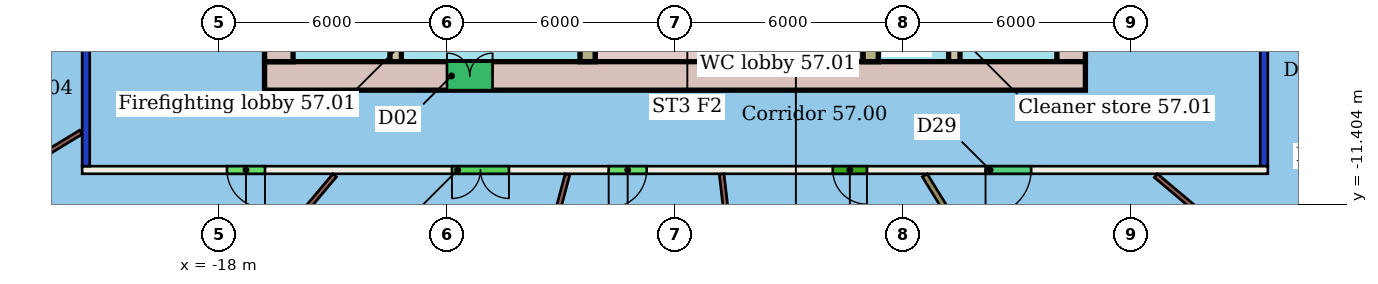
"""IFC4 building model, lengths in metres.
Left out: names, types, materials, properties, quantities, classifications, styles, units other than length and angle.
Written with IfcOpenShell. Run it as: python <this file> out.ifc"""

import sys

from ifc_helpers import new_model, si_unit, direction, frame, frame_2d, origin, place, context, subcontext, project, spatial, rectangle, extrude, element, fill, save


model = new_model("IFC4")
c1 = context("Model", 3, precision=1e-05, world=origin(), true_north=direction((0.0, 1.0)))
c2 = subcontext(c1, "Body", "Model", "MODEL_VIEW")
j1 = project(units=[si_unit("LENGTHUNIT", "METRE"), si_unit("PLANEANGLEUNIT", "RADIAN")], contexts=[c1])
p1 = place(None, origin())
s1 = spatial("IfcSite", under=j1, at=p1, CompositionType="ELEMENT")
p2 = place(p1, origin())
s2 = spatial("IfcBuilding", under=s1, at=p2, CompositionType="ELEMENT")
p3 = place(p2, frame((0.0, 0.0, 231.7)))
s3 = spatial("IfcBuildingStorey", under=s2, at=p3, CompositionType="ELEMENT", Elevation=231.7)
p4 = place(p3, frame((9.6, -10.5, 0.0), z_axis=(0.0, 0.0, 1.0), x_axis=(-1.0, 0.0, 0.0)))
e1 = element("IfcWall", 1, at=p4, inside=s3, PredefinedType="PARTITIONING", context=c2, shape_type="SweptSolid", body=[
    extrude(rectangle(XDim=31.2, YDim=0.2, at=frame_2d((15.6, 0.0))), origin(), (0.0, 0.0, 1.0), 3.45),
])
p5 = place(p4, frame((26.389, 0.0, 0.0)))
e2 = element("IfcOpeningElement", 2, at=p5, cuts=e1, PredefinedType="OPENING", context=c2, shape_type="SweptSolid", body=[
    extrude(rectangle(XDim=1.0, YDim=2.4, at=frame_2d((0.5, 1.2))), frame((0.0, 0.11, 0.0), z_axis=(0.0, -1.0, 0.0), x_axis=(1.0, 0.0, 0.0)), (0.0, 0.0, 1.0), 0.22),
])
p6 = place(p4, frame((19.969, 0.0, 0.0)))
e3 = element("IfcOpeningElement", 3, at=p6, cuts=e1, PredefinedType="OPENING", context=c2, shape_type="SweptSolid", body=[
    extrude(rectangle(XDim=1.5, YDim=2.1, at=frame_2d((0.75, 1.05))), frame((0.0, 0.11, 0.0), z_axis=(0.0, -1.0, 0.0), x_axis=(1.0, 0.0, 0.0)), (0.0, 0.0, 1.0), 0.22),
])
p7 = place(p4, frame((16.344, 0.0, 0.0)))
e4 = element("IfcOpeningElement", 4, at=p7, cuts=e1, PredefinedType="OPENING", context=c2, shape_type="SweptSolid", body=[
    extrude(rectangle(XDim=1.0, YDim=2.4, at=frame_2d((0.5, 1.2))), frame((0.0, 0.11, 0.0), z_axis=(0.0, -1.0, 0.0), x_axis=(1.0, 0.0, 0.0)), (0.0, 0.0, 1.0), 0.22),
])
p8 = place(p4, frame((10.549, 0.0, 0.0)))
e5 = element("IfcOpeningElement", 5, at=p8, cuts=e1, PredefinedType="OPENING", context=c2, shape_type="SweptSolid", body=[
    extrude(rectangle(XDim=0.9, YDim=2.1, at=frame_2d((0.45, 1.05))), frame((0.0, 0.11, 0.0), z_axis=(0.0, -1.0, 0.0), x_axis=(1.0, 0.0, 0.0)), (0.0, 0.0, 1.0), 0.22),
])
p9 = place(p4, frame((6.228, 0.0, 0.0)))
e6 = element("IfcOpeningElement", 6, at=p9, cuts=e1, PredefinedType="OPENING", context=c2, shape_type="SweptSolid", body=[
    extrude(rectangle(XDim=1.2, YDim=2.4, at=frame_2d((0.6, 1.2))), frame((0.0, 0.11, 0.0), z_axis=(0.0, -1.0, 0.0), x_axis=(1.0, 0.0, 0.0)), (0.0, 0.0, 1.0), 0.22),
])
p10 = place(p3, frame((-21.5, -10.4, 0.0), z_axis=(0.0, 0.0, 1.0), x_axis=(0.0, 1.0, 0.0)))
e7 = element("IfcWall", 7, at=p10, inside=s3, PredefinedType="PARTITIONING", context=c2, shape_type="SweptSolid", body=[
    extrude(rectangle(XDim=20.8, YDim=0.2, at=frame_2d((10.4, 0.0))), origin(), (0.0, 0.0, 1.0), 3.05),
])
p11 = place(p10, frame((14.304, 0.0, 0.0)))
e8 = element("IfcOpeningElement", 8, at=p11, cuts=e7, PredefinedType="OPENING", context=c2, shape_type="SweptSolid", body=[
    extrude(rectangle(XDim=1.0, YDim=2.4, at=frame_2d((0.5, 1.2))), frame((0.0, 0.11, 0.0), z_axis=(0.0, -1.0, 0.0), x_axis=(1.0, 0.0, 0.0)), (0.0, 0.0, 1.0), 0.22),
])
p12 = place(p10, frame((7.593, 0.0, 0.0)))
e9 = element("IfcOpeningElement", 9, at=p12, cuts=e7, PredefinedType="OPENING", context=c2, shape_type="SweptSolid", body=[
    extrude(rectangle(XDim=1.0, YDim=2.4, at=frame_2d((0.5, 1.2))), frame((0.0, 0.11, 0.0), z_axis=(0.0, -1.0, 0.0), x_axis=(1.0, 0.0, 0.0)), (0.0, 0.0, 1.0), 0.22),
])
p13 = place(p3, frame((9.5, 10.4, 0.0), z_axis=(0.0, 0.0, 1.0), x_axis=(0.0, -1.0, 0.0)))
e10 = element("IfcWall", 10, at=p13, inside=s3, PredefinedType="PARTITIONING", context=c2, shape_type="SweptSolid", body=[
    extrude(rectangle(XDim=20.8, YDim=0.2, at=frame_2d((10.4, 0.0))), origin(), (0.0, 0.0, 1.0), 3.05),
])
p14 = place(p13, frame((15.989, 0.0, 0.0)))
e11 = element("IfcOpeningElement", 11, at=p14, cuts=e10, PredefinedType="OPENING", context=c2, shape_type="SweptSolid", body=[
    extrude(rectangle(XDim=1.0, YDim=2.4, at=frame_2d((0.5, 1.2))), frame((0.0, 0.11, 0.0), z_axis=(0.0, -1.0, 0.0), x_axis=(1.0, 0.0, 0.0)), (0.0, 0.0, 1.0), 0.22),
])
p15 = place(p13, frame((11.814, 0.0, 0.0)))
e12 = element("IfcOpeningElement", 12, at=p15, cuts=e10, PredefinedType="OPENING", context=c2, shape_type="SweptSolid", body=[
    extrude(rectangle(XDim=1.0, YDim=2.4, at=frame_2d((0.5, 1.2))), frame((0.0, 0.11, 0.0), z_axis=(0.0, -1.0, 0.0), x_axis=(1.0, 0.0, 0.0)), (0.0, 0.0, 1.0), 0.22),
])
p16 = place(p13, frame((6.499, 0.0, 0.0)))
e13 = element("IfcOpeningElement", 13, at=p16, cuts=e10, PredefinedType="OPENING", context=c2, shape_type="SweptSolid", body=[
    extrude(rectangle(XDim=0.9, YDim=2.1, at=frame_2d((0.45, 1.05))), frame((0.0, 0.11, 0.0), z_axis=(0.0, -1.0, 0.0), x_axis=(1.0, 0.0, 0.0)), (0.0, 0.0, 1.0), 0.22),
])
p17 = place(p13, frame((2.673, 0.0, 0.0)))
e14 = element("IfcOpeningElement", 14, at=p17, cuts=e10, PredefinedType="OPENING", context=c2, shape_type="SweptSolid", body=[
    extrude(rectangle(XDim=1.2, YDim=2.4, at=frame_2d((0.6, 1.2))), frame((0.0, 0.11, 0.0), z_axis=(0.0, -1.0, 0.0), x_axis=(1.0, 0.0, 0.0)), (0.0, 0.0, 1.0), 0.22),
])
p18 = place(p3, frame((-28.092, -13.434, 0.0), z_axis=(0.0, 0.0, 1.0), x_axis=(0.854426088505, 0.519572958574, 0.0)))
e15 = element("IfcWall", 15, at=p18, inside=s3, PredefinedType="PARTITIONING", context=c2, shape_type="SweptSolid", body=[
    extrude(rectangle(XDim=7.56, YDim=0.125, at=frame_2d((3.78, 0.0))), origin(), (0.0, 0.0, 1.0), 3.45),
])
p19 = place(p3, frame((-23.067, -20.282, 0.0), z_axis=(0.0, 0.0, 1.0), x_axis=(0.643851122285, 0.765150790585, 0.0)))
e16 = element("IfcWall", 16, at=p19, inside=s3, PredefinedType="PARTITIONING", context=c2, shape_type="SweptSolid", body=[
    extrude(rectangle(XDim=12.602, YDim=0.125, at=frame_2d((6.301, 0.0))), origin(), (0.0, 0.0, 1.0), 3.45),
])
p20 = place(p3, frame((-12.538, -24.528, 0.0), z_axis=(0.0, 0.0, 1.0), x_axis=(0.257564493881, 0.966261109376, 0.0)))
e17 = element("IfcWall", 17, at=p20, inside=s3, PredefinedType="PARTITIONING", context=c2, shape_type="SweptSolid", body=[
    extrude(rectangle(XDim=14.397, YDim=0.125, at=frame_2d((7.199, 0.0))), origin(), (0.0, 0.0, 1.0), 3.45),
])
p21 = place(p3, frame((-3.289, -23.414, 0.0), z_axis=(0.0, 0.0, 1.0), x_axis=(-0.115007216791, 0.993364656149, 0.0)))
e18 = element("IfcWall", 18, at=p21, inside=s3, PredefinedType="PARTITIONING", context=c2, shape_type="SweptSolid", body=[
    extrude(rectangle(XDim=12.892, YDim=0.125, at=frame_2d((6.446, 0.0))), origin(), (0.0, 0.0, 1.0), 3.45),
])
p22 = place(p3, frame((5.564, -18.722, 0.0), z_axis=(0.0, 0.0, 1.0), x_axis=(-0.525503275837, 0.850791576759, 0.0)))
e19 = element("IfcWall", 19, at=p22, inside=s3, PredefinedType="PARTITIONING", context=c2, shape_type="SweptSolid", body=[
    extrude(rectangle(XDim=9.5, YDim=0.15, at=frame_2d((4.75, 0.0))), origin(), (0.0, 0.0, 1.0), 3.45),
])
p23 = place(p3, frame((10.561, -13.936, 0.0), z_axis=(0.0, 0.0, 1.0), x_axis=(-0.765140481773, 0.643863373048, 0.0)))
e20 = element("IfcWall", 20, at=p23, inside=s3, PredefinedType="PARTITIONING", context=c2, shape_type="SweptSolid", body=[
    extrude(rectangle(XDim=5.107, YDim=0.125, at=frame_2d((2.554, 0.0))), origin(), (0.0, 0.0, 1.0), 3.45),
])
p24 = place(p3, frame((-16.8, -8.025, 0.0), z_axis=(0.0, 0.0, 1.0), x_axis=(1.0, 0.0, 0.0)))
e21 = element("IfcWall", 21, at=p24, inside=s3, PredefinedType="SHEAR", context=c2, shape_type="SweptSolid", body=[
    extrude(rectangle(XDim=21.6, YDim=0.75, at=frame_2d((10.8, 0.0))), origin(), (0.0, 0.0, 1.0), 3.3),
])
p25 = place(p24, frame((4.8, 0.0, 0.0)))
e22 = element("IfcOpeningElement", 22, at=p25, cuts=e21, PredefinedType="OPENING", context=c2, shape_type="SweptSolid", body=[
    extrude(rectangle(XDim=1.2, YDim=2.1, at=frame_2d((0.6, 1.05))), frame((0.0, 0.385, 0.0), z_axis=(0.0, -1.0, 0.0), x_axis=(1.0, 0.0, 0.0)), (0.0, 0.0, 1.0), 0.77),
])
p26 = place(p3, frame((-16.425, 7.65, 0.0), z_axis=(0.0, 0.0, 1.0), x_axis=(0.0, -1.0, 0.0)))
e23 = element("IfcWall", 23, at=p26, inside=s3, PredefinedType="SHEAR", context=c2, shape_type="SweptSolid", body=[
    extrude(rectangle(XDim=15.3, YDim=0.75, at=frame_2d((7.65, 0.0))), origin(), (0.0, 0.0, 1.0), 3.3),
])
p27 = place(p26, frame((11.25, 0.0, 0.0)))
e24 = element("IfcOpeningElement", 24, at=p27, cuts=e23, PredefinedType="OPENING", context=c2, shape_type="SweptSolid", body=[
    extrude(rectangle(XDim=1.2, YDim=2.1, at=frame_2d((0.6, 1.05))), frame((0.0, 0.385, 0.0), z_axis=(0.0, -1.0, 0.0), x_axis=(1.0, 0.0, 0.0)), (0.0, 0.0, 1.0), 0.77),
])
p28 = place(p26, frame((2.85, 0.0, 0.0)))
e25 = element("IfcOpeningElement", 25, at=p28, cuts=e23, PredefinedType="OPENING", context=c2, shape_type="SweptSolid", body=[
    extrude(rectangle(XDim=1.2, YDim=2.1, at=frame_2d((0.6, 1.05))), frame((0.0, 0.385, 0.0), z_axis=(0.0, -1.0, 0.0), x_axis=(1.0, 0.0, 0.0)), (0.0, 0.0, 1.0), 0.77),
])
p29 = place(p3, frame((4.425, -7.65, 0.0), z_axis=(0.0, 0.0, 1.0), x_axis=(0.0, 1.0, 0.0)))
e26 = element("IfcWall", 26, at=p29, inside=s3, PredefinedType="SHEAR", context=c2, shape_type="SweptSolid", body=[
    extrude(rectangle(XDim=15.3, YDim=0.75, at=frame_2d((7.65, 0.0))), origin(), (0.0, 0.0, 1.0), 3.3),
])
p30 = place(p29, frame((2.85, 0.0, 0.0)))
e27 = element("IfcOpeningElement", 27, at=p30, cuts=e26, PredefinedType="OPENING", context=c2, shape_type="SweptSolid", body=[
    extrude(rectangle(XDim=1.2, YDim=2.1, at=frame_2d((0.6, 1.05))), frame((0.0, 0.385, 0.0), z_axis=(0.0, -1.0, 0.0), x_axis=(1.0, 0.0, 0.0)), (0.0, 0.0, 1.0), 0.77),
])
p31 = place(p29, frame((11.25, 0.0, 0.0)))
e28 = element("IfcOpeningElement", 28, at=p31, cuts=e26, PredefinedType="OPENING", context=c2, shape_type="SweptSolid", body=[
    extrude(rectangle(XDim=1.2, YDim=2.1, at=frame_2d((0.6, 1.05))), frame((0.0, 0.385, 0.0), z_axis=(0.0, -1.0, 0.0), x_axis=(1.0, 0.0, 0.0)), (0.0, 0.0, 1.0), 0.77),
])
p32 = place(p3, frame((-13.35, 7.65, 0.0), z_axis=(0.0, 0.0, 1.0), x_axis=(0.0, -1.0, 0.0)))
e29 = element("IfcWall", 29, at=p32, inside=s3, PredefinedType="SHEAR", context=c2, shape_type="SweptSolid", body=[
    extrude(rectangle(XDim=15.3, YDim=0.3, at=frame_2d((7.65, 0.0))), origin(), (0.0, 0.0, 1.0), 3.3),
])
p33 = place(p32, frame((6.9, 0.0, 0.0)))
e30 = element("IfcOpeningElement", 30, at=p33, cuts=e29, PredefinedType="OPENING", context=c2, shape_type="SweptSolid", body=[
    extrude(rectangle(XDim=1.5, YDim=2.1, at=frame_2d((0.75, 1.05))), frame((0.0, 0.16, 0.0), z_axis=(0.0, -1.0, 0.0), x_axis=(1.0, 0.0, 0.0)), (0.0, 0.0, 1.0), 0.32),
])
p34 = place(p3, frame((1.35, -7.65, 0.0), z_axis=(0.0, 0.0, 1.0), x_axis=(0.0, 1.0, 0.0)))
e31 = element("IfcWall", 31, at=p34, inside=s3, PredefinedType="SHEAR", context=c2, shape_type="SweptSolid", body=[
    extrude(rectangle(XDim=15.3, YDim=0.3, at=frame_2d((7.65, 0.0))), origin(), (0.0, 0.0, 1.0), 3.3),
])
p35 = place(p34, frame((1.56, 0.0, 0.0)))
e32 = element("IfcOpeningElement", 32, at=p35, cuts=e31, PredefinedType="OPENING", context=c2, shape_type="SweptSolid", body=[
    extrude(rectangle(XDim=1.0, YDim=2.1, at=frame_2d((0.5, 1.05))), frame((0.0, 0.16, 0.0), z_axis=(0.0, -1.0, 0.0), x_axis=(1.0, 0.0, 0.0)), (0.0, 0.0, 1.0), 0.32),
])
p36 = place(p34, frame((6.9, 0.0, 0.0)))
e33 = element("IfcOpeningElement", 33, at=p36, cuts=e31, PredefinedType="OPENING", context=c2, shape_type="SweptSolid", body=[
    extrude(rectangle(XDim=1.5, YDim=2.1, at=frame_2d((0.75, 1.05))), frame((0.0, 0.16, 0.0), z_axis=(0.0, -1.0, 0.0), x_axis=(1.0, 0.0, 0.0)), (0.0, 0.0, 1.0), 0.32),
])
p37 = place(p3, frame((-8.3, -3.88, 0.0), z_axis=(0.0, 0.0, 1.0), x_axis=(0.0, -1.0, 0.0)))
e34 = element("IfcWall", 34, at=p37, inside=s3, PredefinedType="SHEAR", context=c2, shape_type="SweptSolid", body=[
    extrude(rectangle(XDim=3.77, YDim=0.4, at=frame_2d((1.885, 0.0))), origin(), (0.0, 0.0, 1.0), 3.3),
])
p38 = place(p37, frame((1.11, 0.0, 0.0)))
e35 = element("IfcOpeningElement", 35, at=p38, cuts=e34, PredefinedType="OPENING", context=c2, shape_type="SweptSolid", body=[
    extrude(rectangle(XDim=1.2, YDim=2.1, at=frame_2d((0.6, 1.05))), frame((0.0, 0.21, 0.0), z_axis=(0.0, -1.0, 0.0), x_axis=(1.0, 0.0, 0.0)), (0.0, 0.0, 1.0), 0.42),
])
p39 = place(p3, frame((-0.85, -3.88, 0.0), z_axis=(0.0, 0.0, 1.0), x_axis=(0.0, -1.0, 0.0)))
e36 = element("IfcWall", 36, at=p39, inside=s3, PredefinedType="SHEAR", context=c2, shape_type="SweptSolid", body=[
    extrude(rectangle(XDim=3.77, YDim=0.4, at=frame_2d((1.885, 0.0))), origin(), (0.0, 0.0, 1.0), 3.3),
])
p40 = place(p3, frame((-8.1, -7.475, 0.0), z_axis=(0.0, 0.0, 1.0), x_axis=(1.0, 0.0, 0.0)))
e37 = element("IfcWall", 37, at=p40, inside=s3, PredefinedType="SHEAR", context=c2, shape_type="SweptSolid", body=[
    extrude(rectangle(XDim=7.05, YDim=0.35, at=frame_2d((3.525, 0.0))), origin(), (0.0, 0.0, 1.0), 3.3),
])
p41 = place(p5, origin())
e38 = element("IfcDoor", 38, at=p41, inside=s3, OperationType="SINGLE_SWING_LEFT", PredefinedType="DOOR", context=c2, shape_type="SweptSolid", body=[
    extrude(rectangle(XDim=1.0, YDim=2.4, at=frame_2d((0.5, 1.2))), frame((0.0, 0.025, 0.0), z_axis=(0.0, -1.0, 0.0), x_axis=(1.0, 0.0, 0.0)), (0.0, 0.0, 1.0), 0.05),
])
fill(e2, e38)
p42 = place(p6, origin())
e39 = element("IfcDoor", 39, at=p42, inside=s3, OperationType="DOUBLE_DOOR_SINGLE_SWING", PredefinedType="DOOR", context=c2, shape_type="SweptSolid", body=[
    extrude(rectangle(XDim=1.5, YDim=2.1, at=frame_2d((0.75, 1.05))), frame((0.0, 0.025, 0.0), z_axis=(0.0, -1.0, 0.0), x_axis=(1.0, 0.0, 0.0)), (0.0, 0.0, 1.0), 0.05),
])
fill(e3, e39)
p43 = place(p7, origin())
e40 = element("IfcDoor", 40, at=p43, inside=s3, OperationType="SINGLE_SWING_RIGHT", PredefinedType="DOOR", context=c2, shape_type="SweptSolid", body=[
    extrude(rectangle(XDim=1.0, YDim=2.4, at=frame_2d((0.5, 1.2))), frame((0.0, 0.025, 0.0), z_axis=(0.0, -1.0, 0.0), x_axis=(1.0, 0.0, 0.0)), (0.0, 0.0, 1.0), 0.05),
])
fill(e4, e40)
p44 = place(p8, origin())
e41 = element("IfcDoor", 41, at=p44, inside=s3, OperationType="SINGLE_SWING_LEFT", PredefinedType="DOOR", context=c2, shape_type="SweptSolid", body=[
    extrude(rectangle(XDim=0.9, YDim=2.1, at=frame_2d((0.45, 1.05))), frame((0.0, 0.025, 0.0), z_axis=(0.0, -1.0, 0.0), x_axis=(1.0, 0.0, 0.0)), (0.0, 0.0, 1.0), 0.05),
])
fill(e5, e41)
p45 = place(p9, origin())
e42 = element("IfcDoor", 42, at=p45, inside=s3, OperationType="SINGLE_SWING_RIGHT", PredefinedType="DOOR", context=c2, shape_type="SweptSolid", body=[
    extrude(rectangle(XDim=1.2, YDim=2.4, at=frame_2d((0.6, 1.2))), frame((0.0, 0.025, 0.0), z_axis=(0.0, -1.0, 0.0), x_axis=(1.0, 0.0, 0.0)), (0.0, 0.0, 1.0), 0.05),
])
fill(e6, e42)
p46 = place(p25, origin())
e43 = element("IfcDoor", 43, at=p46, inside=s3, OperationType="DOUBLE_DOOR_SINGLE_SWING", PredefinedType="NOTDEFINED", context=c2, shape_type="SweptSolid", body=[
    extrude(rectangle(XDim=1.2, YDim=2.1, at=frame_2d((0.6, 1.05))), frame((0.0, 0.025, 0.0), z_axis=(0.0, -1.0, 0.0), x_axis=(1.0, 0.0, 0.0)), (0.0, 0.0, 1.0), 0.05),
])
fill(e22, e43)
save(model, sys.argv[1])
